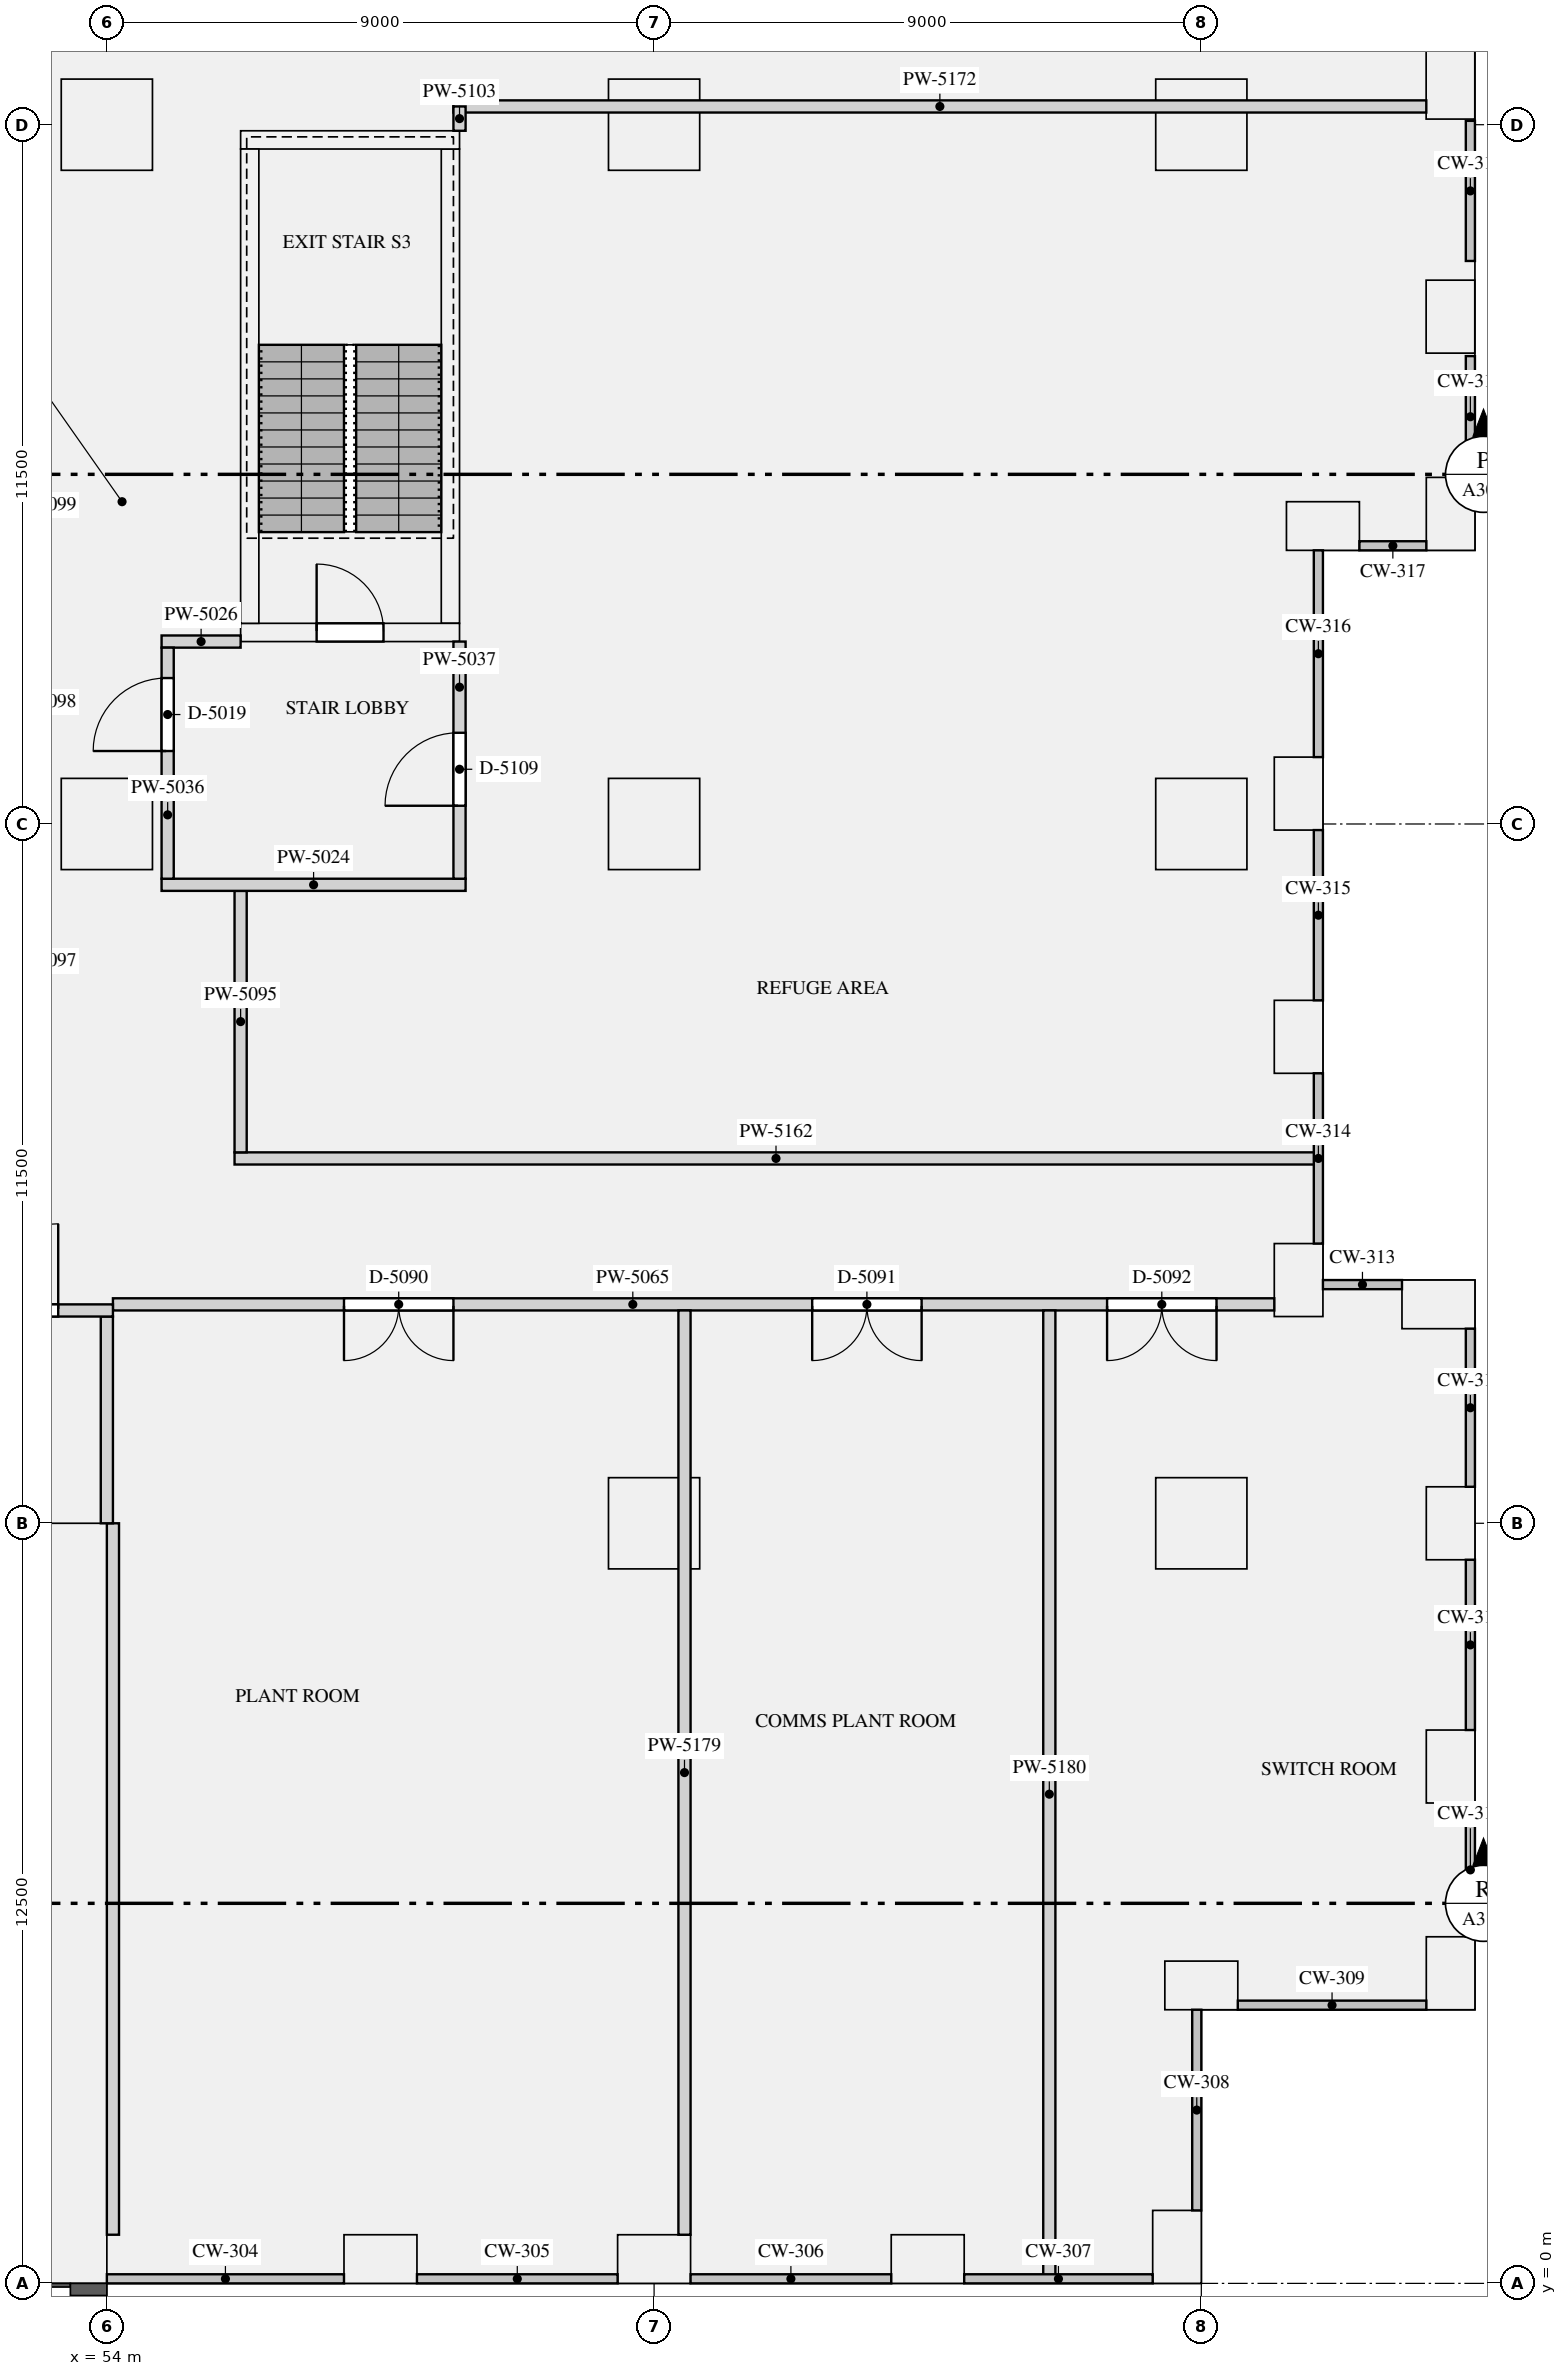
"""IFC4 building model, lengths in metres.
Left out: names, types, materials, properties, quantities, classifications, styles, units other than length and angle.
Written with IfcOpenShell. Run it as: python <this file> out.ifc"""

import sys

from ifc_helpers import new_model, si_unit, direction, frame, frame_2d, origin, origin_2d, place, context, subcontext, project, spatial, rectangle, extrude, element, fill, save


model = new_model("IFC4")
c1 = context("Model", 3, precision=1e-05, world=origin(), true_north=direction((0.0, 1.0)))
c2 = subcontext(c1, "Body", "Model", "MODEL_VIEW")
j1 = project(units=[si_unit("LENGTHUNIT", "METRE"), si_unit("PLANEANGLEUNIT", "RADIAN")], contexts=[c1])
p1 = place(None, origin())
s1 = spatial("IfcSite", under=j1, at=p1, CompositionType="ELEMENT")
p2 = place(p1, origin())
s2 = spatial("IfcBuilding", under=s1, at=p2, CompositionType="ELEMENT")
p3 = place(p2, frame((0.0, 0.0, 73.05)))
s3 = spatial("IfcBuildingStorey", under=s2, at=p3, CompositionType="ELEMENT", Elevation=73.05)
for number, where, z_axis, x_axis in (
    (1, (76.1, 5.1, 0.0), (0.0, 0.0, 1.0), (0.0, 1.0, 0.0)),
    (2, (76.1, 8.5, 0.0), (0.0, 0.0, 1.0), (0.0, 1.0, 0.0)),
    (3, (76.1, 12.5, 0.0), (0.0, 0.0, 1.0), (0.0, 1.0, 0.0)),
    (4, (76.1, 29.1, 0.0), (0.0, 0.0, 1.0), (0.0, 1.0, 0.0)),
    (5, (75.9, 16.1, 0.0), (0.0, 0.0, 1.0), (-1.0, 0.0, 0.0)),
    (6, (73.6, 16.5, 0.0), (0.0, 0.0, 1.0), (0.0, 1.0, 0.0)),
    (7, (73.6, 20.5, 0.0), (0.0, 0.0, 1.0), (0.0, 1.0, 0.0)),
    (8, (73.6, 24.5, 0.0), (0.0, 0.0, 1.0), (0.0, 1.0, 0.0)),
    (9, (74.0, 28.9, 0.0), (0.0, 0.0, 1.0), (1.0, 0.0, 0.0)),
    (10, (58.5, 0.4, 0.0), (0.0, 0.0, 1.0), (1.0, 0.0, 0.0)),
    (11, (63.0, 0.4, 0.0), (0.0, 0.0, 1.0), (1.0, 0.0, 0.0)),
    (12, (67.5, 0.4, 0.0), (0.0, 0.0, 1.0), (1.0, 0.0, 0.0)),
    (13, (71.6, 0.6, 0.0), (0.0, 0.0, 1.0), (0.0, 1.0, 0.0)),
    (14, (72.0, 4.9, 0.0), (0.0, 0.0, 1.0), (1.0, 0.0, 0.0)),
):
    element("IfcColumn", number, at=place(p3, frame(where, z_axis=z_axis, x_axis=x_axis)), inside=s3, PredefinedType="USERDEFINED", context=c2, shape_type="SweptSolid", body=[
        extrude(rectangle(XDim=1.2, YDim=0.8, at=origin_2d()), origin(), (0.0, 0.0, 1.0), 4.2),
    ])
p4 = place(p3, frame((76.097, 32.343, -0.456), z_axis=(0.005913732337, 0.069380752599, 0.997572723634), x_axis=(-0.084721827764, -0.993968586445, 0.069632327703)))
e15 = element("IfcColumn", 15, at=p4, inside=s3, PredefinedType="USERDEFINED", context=c2, shape_type="SweptSolid", body=[
    extrude(rectangle(XDim=1.2, YDim=0.8, at=origin_2d()), origin(), (0.0, 0.0, 1.0), 4.624),
])
p5 = place(p3, frame((76.097, 36.192, -0.416), z_axis=(0.00592434117, 0.137487413096, 0.990485796678), x_axis=(-0.042640526386, -0.989567531264, 0.137614994017)))
e16 = element("IfcColumn", 16, at=p5, inside=s3, PredefinedType="USERDEFINED", context=c2, shape_type="SweptSolid", body=[
    extrude(rectangle(XDim=1.2, YDim=0.8, at=origin_2d()), origin(), (0.0, 0.0, 1.0), 4.574),
])
for number, where, z_axis, x_axis in (
    (17, (54.0, 24.0, 0.0), (0.0, 0.0, 1.0), (1.0, 0.0, 0.0)),
    (18, (63.0, 24.0, 0.0), (0.0, 0.0, 1.0), (1.0, 0.0, 0.0)),
    (19, (72.0, 24.0, 0.0), (0.0, 0.0, 1.0), (1.0, 0.0, 0.0)),
    (20, (54.0, 35.5, 0.0), (0.0, 0.0, 1.0), (1.0, 0.0, 0.0)),
    (21, (63.0, 35.5, 0.0), (0.0, 0.0, 1.0), (1.0, 0.0, 0.0)),
    (22, (72.0, 35.5, 0.0), (0.0, 0.0, 1.0), (1.0, 0.0, 0.0)),
    (23, (63.0, 12.5, 0.0), (0.0, 0.0, 1.0), (1.0, 0.0, 0.0)),
    (24, (72.0, 12.5, 0.0), (0.0, 0.0, 1.0), (1.0, 0.0, 0.0)),
):
    element("IfcColumn", number, at=place(p3, frame(where, z_axis=z_axis, x_axis=x_axis)), inside=s3, PredefinedType="COLUMN", context=c2, shape_type="SweptSolid", body=[
        extrude(rectangle(XDim=1.5, YDim=1.5, at=origin_2d()), origin(), (0.0, 0.0, 1.0), 4.2),
    ])
p6 = place(p3, frame((53.5, 0.0, 0.0), z_axis=(0.0, 0.0, 1.0), x_axis=(0.0, 1.0, 0.0)))
e25 = element("IfcWall", 25, at=p6, inside=s3, PredefinedType="SHEAR", context=c2, shape_type="SweptSolid", body=[
    extrude(rectangle(XDim=12.5, YDim=1.0, at=frame_2d((6.25, 0.0))), origin(), (0.0, 0.0, 1.0), 4.2),
])
p7 = place(p3, frame((56.2, 27.15, 0.0), z_axis=(0.0, 0.0, 1.0), x_axis=(1.0, 0.0, 0.0)))
e26 = element("IfcWall", 26, at=p7, inside=s3, PredefinedType="SHEAR", context=c2, shape_type="SweptSolid", body=[
    extrude(rectangle(XDim=3.6, YDim=0.3, at=frame_2d((1.8, 0.0))), origin(), (0.0, 0.0, 1.0), 4.2),
])
p8 = place(p7, frame((1.25, 0.0, 0.0)))
e27 = element("IfcOpeningElement", 27, at=p8, cuts=e26, PredefinedType="OPENING", context=c2, shape_type="SweptSolid", body=[
    extrude(rectangle(XDim=1.1, YDim=2.1, at=frame_2d((0.55, 1.05))), frame((0.0, 0.16, 0.0), z_axis=(0.0, -1.0, 0.0), x_axis=(1.0, 0.0, 0.0)), (0.0, 0.0, 1.0), 0.32),
])
p9 = place(p3, frame((56.2, 35.25, 0.0), z_axis=(0.0, 0.0, 1.0), x_axis=(1.0, 0.0, 0.0)))
e28 = element("IfcWall", 28, at=p9, inside=s3, PredefinedType="SHEAR", context=c2, shape_type="SweptSolid", body=[
    extrude(rectangle(XDim=3.6, YDim=0.3, at=frame_2d((1.8, 0.0))), origin(), (0.0, 0.0, 1.0), 4.2),
])
for number, where, z_axis, x_axis in (
    (29, (56.35, 27.3, 0.0), (0.0, 0.0, 1.0), (0.0, 1.0, 0.0)),
    (30, (59.65, 27.3, 0.0), (0.0, 0.0, 1.0), (0.0, 1.0, 0.0)),
):
    element("IfcWall", number, at=place(p3, frame(where, z_axis=z_axis, x_axis=x_axis)), inside=s3, PredefinedType="SHEAR", context=c2, shape_type="SweptSolid", body=[
        extrude(rectangle(XDim=7.8, YDim=0.3, at=frame_2d((3.9, 0.0))), origin(), (0.0, 0.0, 1.0), 4.2),
    ])
p10 = place(p3, frame((54.9, 23.0, 0.0), z_axis=(0.0, 0.0, 1.0), x_axis=(1.0, 0.0, 0.0)))
e31 = element("IfcWall", 31, at=p10, inside=s3, PredefinedType="PARTITIONING", context=c2, shape_type="SweptSolid", body=[
    extrude(rectangle(XDim=5.0, YDim=0.2, at=frame_2d((2.5, 0.0))), origin(), (0.0, 0.0, 1.0), 3.7),
])
p11 = place(p3, frame((54.9, 27.0, 0.0), z_axis=(0.0, 0.0, 1.0), x_axis=(1.0, 0.0, 0.0)))
e32 = element("IfcWall", 32, at=p11, inside=s3, PredefinedType="PARTITIONING", context=c2, shape_type="SweptSolid", body=[
    extrude(rectangle(XDim=1.3, YDim=0.2, at=frame_2d((0.65, 0.0))), origin(), (0.0, 0.0, 1.0), 3.7),
])
p12 = place(p3, frame((54.0, 12.5, 0.0), z_axis=(0.0, 0.0, 1.0), x_axis=(0.0, 1.0, 0.0)))
e33 = element("IfcWall", 33, at=p12, inside=s3, PredefinedType="PARTITIONING", context=c2, shape_type="SweptSolid", body=[
    extrude(rectangle(XDim=3.4, YDim=0.2, at=frame_2d((1.7, 0.0))), origin(), (0.0, 0.0, 1.0), 3.7),
])
p13 = place(p3, frame((55.0, 23.1, 0.0), z_axis=(0.0, 0.0, 1.0), x_axis=(0.0, 1.0, 0.0)))
e34 = element("IfcWall", 34, at=p13, inside=s3, PredefinedType="PARTITIONING", context=c2, shape_type="SweptSolid", body=[
    extrude(rectangle(XDim=3.8, YDim=0.2, at=frame_2d((1.9, 0.0))), origin(), (0.0, 0.0, 1.0), 3.7),
])
p14 = place(p13, frame((2.1, 0.0, 0.0)))
e35 = element("IfcOpeningElement", 35, at=p14, cuts=e34, PredefinedType="OPENING", context=c2, shape_type="SweptSolid", body=[
    extrude(rectangle(XDim=1.2, YDim=2.1, at=frame_2d((0.6, 1.05))), frame((0.0, 0.11, 0.0), z_axis=(0.0, -1.0, 0.0), x_axis=(1.0, 0.0, 0.0)), (0.0, 0.0, 1.0), 0.22),
])
p15 = place(p3, frame((59.8, 23.1, 0.0), z_axis=(0.0, 0.0, 1.0), x_axis=(0.0, 1.0, 0.0)))
e36 = element("IfcWall", 36, at=p15, inside=s3, PredefinedType="PARTITIONING", context=c2, shape_type="SweptSolid", body=[
    extrude(rectangle(XDim=3.9, YDim=0.2, at=frame_2d((1.95, 0.0))), origin(), (0.0, 0.0, 1.0), 3.7),
])
p16 = place(p15, frame((1.2, 0.0, 0.0)))
e37 = element("IfcOpeningElement", 37, at=p16, cuts=e36, PredefinedType="OPENING", context=c2, shape_type="SweptSolid", body=[
    extrude(rectangle(XDim=1.2, YDim=2.1, at=frame_2d((0.6, 1.05))), frame((0.0, 0.11, 0.0), z_axis=(0.0, -1.0, 0.0), x_axis=(1.0, 0.0, 0.0)), (0.0, 0.0, 1.0), 0.22),
])
p17 = place(p3, frame((17.9, 16.0, 0.0), z_axis=(0.0, 0.0, 1.0), x_axis=(1.0, 0.0, 0.0)))
e38 = element("IfcWall", 38, at=p17, inside=s3, PredefinedType="PARTITIONING", context=c2, shape_type="SweptSolid", body=[
    extrude(rectangle(XDim=36.2, YDim=0.2, at=frame_2d((18.1, 0.0))), origin(), (0.0, 0.0, 1.0), 3.7),
])
p18 = place(p17, frame((0.9, 0.0, 0.0)))
e39 = element("IfcOpeningElement", 39, at=p18, cuts=e38, PredefinedType="OPENING", context=c2, shape_type="SweptSolid", body=[
    extrude(rectangle(XDim=1.4, YDim=2.1, at=frame_2d((0.7, 1.05))), frame((0.0, 0.11, 0.0), z_axis=(0.0, -1.0, 0.0), x_axis=(1.0, 0.0, 0.0)), (0.0, 0.0, 1.0), 0.22),
])
p19 = place(p17, frame((33.9, 0.0, 0.0)))
e40 = element("IfcOpeningElement", 40, at=p19, cuts=e38, PredefinedType="OPENING", context=c2, shape_type="SweptSolid", body=[
    extrude(rectangle(XDim=1.4, YDim=2.1, at=frame_2d((0.7, 1.05))), frame((0.0, 0.11, 0.0), z_axis=(0.0, -1.0, 0.0), x_axis=(1.0, 0.0, 0.0)), (0.0, 0.0, 1.0), 0.22),
])
p20 = place(p3, frame((54.1, 16.1, 0.0), z_axis=(0.0, 0.0, 1.0), x_axis=(1.0, 0.0, 0.0)))
e41 = element("IfcWall", 41, at=p20, inside=s3, PredefinedType="PARTITIONING", context=c2, shape_type="SweptSolid", body=[
    extrude(rectangle(XDim=19.1, YDim=0.2, at=frame_2d((9.55, 0.0))), origin(), (0.0, 0.0, 1.0), 3.7),
])
p21 = place(p20, frame((3.8, 0.0, 0.0)))
e42 = element("IfcOpeningElement", 42, at=p21, cuts=e41, PredefinedType="OPENING", context=c2, shape_type="SweptSolid", body=[
    extrude(rectangle(XDim=1.8, YDim=2.1, at=frame_2d((0.9, 1.05))), frame((0.0, 0.11, 0.0), z_axis=(0.0, -1.0, 0.0), x_axis=(1.0, 0.0, 0.0)), (0.0, 0.0, 1.0), 0.22),
])
p22 = place(p20, frame((11.5, 0.0, 0.0)))
e43 = element("IfcOpeningElement", 43, at=p22, cuts=e41, PredefinedType="OPENING", context=c2, shape_type="SweptSolid", body=[
    extrude(rectangle(XDim=1.8, YDim=2.1, at=frame_2d((0.9, 1.05))), frame((0.0, 0.11, 0.0), z_axis=(0.0, -1.0, 0.0), x_axis=(1.0, 0.0, 0.0)), (0.0, 0.0, 1.0), 0.22),
])
p23 = place(p20, frame((16.35, 0.0, 0.0)))
e44 = element("IfcOpeningElement", 44, at=p23, cuts=e41, PredefinedType="OPENING", context=c2, shape_type="SweptSolid", body=[
    extrude(rectangle(XDim=1.8, YDim=2.1, at=frame_2d((0.9, 1.05))), frame((0.0, 0.11, 0.0), z_axis=(0.0, -1.0, 0.0), x_axis=(1.0, 0.0, 0.0)), (0.0, 0.0, 1.0), 0.22),
])
p24 = place(p3, frame((56.1, 18.5, 0.0), z_axis=(0.0, 0.0, 1.0), x_axis=(1.0, 0.0, 0.0)))
e45 = element("IfcWall", 45, at=p24, inside=s3, PredefinedType="PARTITIONING", context=c2, shape_type="SweptSolid", body=[
    extrude(rectangle(XDim=17.81, YDim=0.2, at=frame_2d((8.905, 0.0))), origin(), (0.0, 0.0, 1.0), 3.7),
])
p25 = place(p3, frame((59.7, 35.8, 0.0), z_axis=(0.0, 0.0, 1.0), x_axis=(1.0, 0.0, 0.0)))
e46 = element("IfcWall", 46, at=p25, inside=s3, PredefinedType="PARTITIONING", context=c2, shape_type="SweptSolid", body=[
    extrude(rectangle(XDim=16.0, YDim=0.2, at=frame_2d((8.0, 0.0))), origin(), (0.0, 0.0, 1.0), 3.7),
])
p26 = place(p3, frame((54.1, 0.8, 0.0), z_axis=(0.0, 0.0, 1.0), x_axis=(0.0, 1.0, 0.0)))
e47 = element("IfcWall", 47, at=p26, inside=s3, PredefinedType="PARTITIONING", context=c2, shape_type="SweptSolid", body=[
    extrude(rectangle(XDim=11.7, YDim=0.2, at=frame_2d((5.85, 0.0))), origin(), (0.0, 0.0, 1.0), 3.7),
])
p27 = place(p3, frame((63.5, 0.8, 0.0), z_axis=(0.0, 0.0, 1.0), x_axis=(0.0, 1.0, 0.0)))
e48 = element("IfcWall", 48, at=p27, inside=s3, PredefinedType="PARTITIONING", context=c2, shape_type="SweptSolid", body=[
    extrude(rectangle(XDim=15.2, YDim=0.2, at=frame_2d((7.6, 0.0))), origin(), (0.0, 0.0, 1.0), 3.7),
])
p28 = place(p3, frame((69.5, 0.09, 0.0), z_axis=(0.0, 0.0, 1.0), x_axis=(0.0, 1.0, 0.0)))
e49 = element("IfcWall", 49, at=p28, inside=s3, PredefinedType="PARTITIONING", context=c2, shape_type="SweptSolid", body=[
    extrude(rectangle(XDim=15.91, YDim=0.2, at=frame_2d((7.955, 0.0))), origin(), (0.0, 0.0, 1.0), 3.7),
])
p29 = place(p3, frame((56.2, 18.6, 0.0), z_axis=(0.0, 0.0, 1.0), x_axis=(0.0, 1.0, 0.0)))
e50 = element("IfcWall", 50, at=p29, inside=s3, PredefinedType="PARTITIONING", context=c2, shape_type="SweptSolid", body=[
    extrude(rectangle(XDim=4.3, YDim=0.2, at=frame_2d((2.15, 0.0))), origin(), (0.0, 0.0, 1.0), 3.7),
])
p30 = place(p3, frame((59.8, 35.4, 0.0), z_axis=(0.0, 0.0, 1.0), x_axis=(0.0, 1.0, 0.0)))
e51 = element("IfcWall", 51, at=p30, inside=s3, PredefinedType="PARTITIONING", context=c2, shape_type="SweptSolid", body=[
    extrude(rectangle(XDim=0.4, YDim=0.2, at=frame_2d((0.2, 0.0))), origin(), (0.0, 0.0, 1.0), 3.7),
])
p31 = place(p8, origin())
e52 = element("IfcDoor", 52, at=p31, inside=s3, OperationType="SINGLE_SWING_LEFT", PredefinedType="DOOR", context=c2, shape_type="SweptSolid", body=[
    extrude(rectangle(XDim=1.1, YDim=2.1, at=frame_2d((0.55, 1.05))), frame((0.0, 0.025, 0.0), z_axis=(0.0, -1.0, 0.0), x_axis=(1.0, 0.0, 0.0)), (0.0, 0.0, 1.0), 0.05),
])
fill(e27, e52)
p32 = place(p14, origin())
e53 = element("IfcDoor", 53, at=p32, inside=s3, OperationType="SINGLE_SWING_LEFT", PredefinedType="DOOR", context=c2, shape_type="SweptSolid", body=[
    extrude(rectangle(XDim=1.2, YDim=2.1, at=frame_2d((0.6, 1.05))), frame((0.0, 0.025, 0.0), z_axis=(0.0, -1.0, 0.0), x_axis=(1.0, 0.0, 0.0)), (0.0, 0.0, 1.0), 0.05),
])
fill(e35, e53)
p33 = place(p19, origin())
e54 = element("IfcDoor", 54, at=p33, inside=s3, OperationType="SINGLE_SWING_RIGHT", PredefinedType="DOOR", context=c2, shape_type="SweptSolid", body=[
    extrude(rectangle(XDim=1.4, YDim=2.1, at=frame_2d((0.7, 1.05))), frame((0.0, 0.025, 0.0), z_axis=(0.0, -1.0, 0.0), x_axis=(1.0, 0.0, 0.0)), (0.0, 0.0, 1.0), 0.05),
])
fill(e40, e54)
p34 = place(p21, frame((1.8, 0.0, 0.0), z_axis=(0.0, 0.0, 1.0), x_axis=(-1.0, 0.0, 0.0)))
e55 = element("IfcDoor", 55, at=p34, inside=s3, OperationType="DOUBLE_DOOR_SINGLE_SWING", PredefinedType="DOOR", context=c2, shape_type="SweptSolid", body=[
    extrude(rectangle(XDim=1.8, YDim=2.1, at=frame_2d((0.9, 1.05))), frame((0.0, 0.025, 0.0), z_axis=(0.0, -1.0, 0.0), x_axis=(1.0, 0.0, 0.0)), (0.0, 0.0, 1.0), 0.05),
])
fill(e42, e55)
p35 = place(p22, frame((1.8, 0.0, 0.0), z_axis=(0.0, 0.0, 1.0), x_axis=(-1.0, 0.0, 0.0)))
e56 = element("IfcDoor", 56, at=p35, inside=s3, OperationType="DOUBLE_DOOR_SINGLE_SWING", PredefinedType="DOOR", context=c2, shape_type="SweptSolid", body=[
    extrude(rectangle(XDim=1.8, YDim=2.1, at=frame_2d((0.9, 1.05))), frame((0.0, 0.025, 0.0), z_axis=(0.0, -1.0, 0.0), x_axis=(1.0, 0.0, 0.0)), (0.0, 0.0, 1.0), 0.05),
])
fill(e43, e56)
p36 = place(p23, frame((1.8, 0.0, 0.0), z_axis=(0.0, 0.0, 1.0), x_axis=(-1.0, 0.0, 0.0)))
e57 = element("IfcDoor", 57, at=p36, inside=s3, OperationType="DOUBLE_DOOR_SINGLE_SWING", PredefinedType="DOOR", context=c2, shape_type="SweptSolid", body=[
    extrude(rectangle(XDim=1.8, YDim=2.1, at=frame_2d((0.9, 1.05))), frame((0.0, 0.025, 0.0), z_axis=(0.0, -1.0, 0.0), x_axis=(1.0, 0.0, 0.0)), (0.0, 0.0, 1.0), 0.05),
])
fill(e44, e57)
p37 = place(p16, origin())
e58 = element("IfcDoor", 58, at=p37, inside=s3, OperationType="SINGLE_SWING_LEFT", PredefinedType="DOOR", context=c2, shape_type="SweptSolid", body=[
    extrude(rectangle(XDim=1.2, YDim=2.1, at=frame_2d((0.6, 1.05))), frame((0.0, 0.025, 0.0), z_axis=(0.0, -1.0, 0.0), x_axis=(1.0, 0.0, 0.0)), (0.0, 0.0, 1.0), 0.05),
])
fill(e37, e58)
save(model, sys.argv[1])
